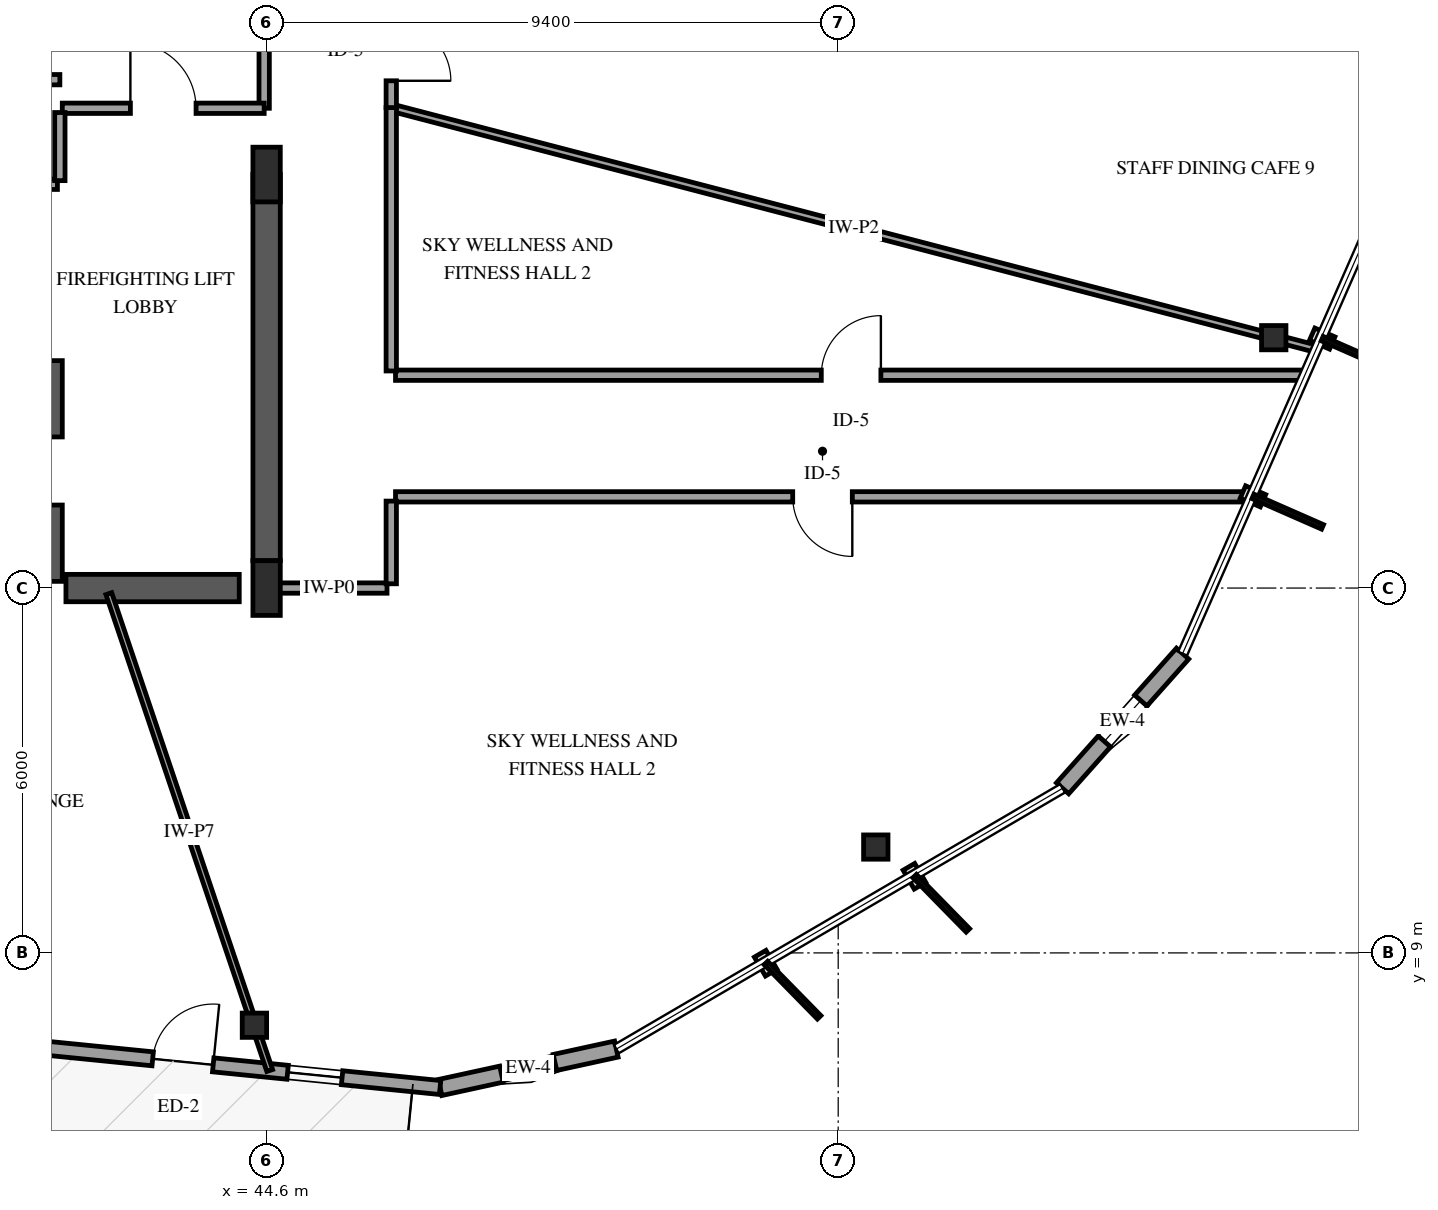
"""IFC4 building model, lengths in metres.
Left out: names, types, materials, properties, quantities, classifications, styles, units other than length and angle.
Written with IfcOpenShell. Run it as: python <this file> out.ifc"""

import sys

from ifc_helpers import new_model, si_unit, direction, frame, frame_2d, origin, origin_2d, place, context, subcontext, project, spatial, rectangle, i_section, extrude, element, fill, save


model = new_model("IFC4")
c1 = context("Model", 3, precision=1e-05, world=origin(), true_north=direction((0.0, 1.0)))
c2 = subcontext(c1, "Body", "Model", "MODEL_VIEW")
j1 = project(units=[si_unit("LENGTHUNIT", "METRE"), si_unit("PLANEANGLEUNIT", "RADIAN")], contexts=[c1])
p1 = place(None, origin())
s1 = spatial("IfcSite", under=j1, at=p1, CompositionType="ELEMENT")
p2 = place(p1, origin())
s2 = spatial("IfcBuilding", under=s1, at=p2, CompositionType="ELEMENT")
p3 = place(p2, frame((0.0, 0.0, 276.25)))
s3 = spatial("IfcBuildingStorey", under=s2, at=p3, CompositionType="ELEMENT", Elevation=276.25)
p4 = place(p3, frame((41.12, 15.11, 0.0), z_axis=(0.0, 0.0, 1.0), x_axis=(0.0, 1.0, 0.0)))
e1 = element("IfcWall", 1, at=p4, inside=s3, PredefinedType="SHEAR", context=c2, shape_type="SweptSolid", body=[
    extrude(rectangle(XDim=3.63, YDim=0.24, at=frame_2d((1.815, 0.0))), origin(), (0.0, 0.0, 1.0), 3.75),
])
p5 = place(p4, frame((1.255, 0.0, 0.0)))
e2 = element("IfcOpeningElement", 2, at=p5, cuts=e1, PredefinedType="OPENING", context=c2, shape_type="SweptSolid", body=[
    extrude(rectangle(XDim=1.12, YDim=2.15, at=frame_2d((0.56, 1.075))), frame((0.0, 0.13, 0.0), z_axis=(0.0, -1.0, 0.0), x_axis=(1.0, 0.0, 0.0)), (0.0, 0.0, 1.0), 0.26),
])
p6 = place(p3, frame((41.3, 15.0, 0.0), z_axis=(0.0, 0.0, 1.0), x_axis=(1.0, 0.0, 0.0)))
e3 = element("IfcWall", 3, at=p6, inside=s3, PredefinedType="SHEAR", context=c2, shape_type="SweptSolid", body=[
    extrude(rectangle(XDim=2.85, YDim=0.45, at=frame_2d((1.425, 0.0))), origin(), (0.0, 0.0, 1.0), 3.75),
])
p7 = place(p3, frame((44.6, 15.45, 0.0), z_axis=(0.0, 0.0, 1.0), x_axis=(0.0, 1.0, 0.0)))
e4 = element("IfcWall", 4, at=p7, inside=s3, PredefinedType="SHEAR", context=c2, shape_type="SweptSolid", body=[
    extrude(rectangle(XDim=6.35, YDim=0.45, at=frame_2d((3.175, 0.0))), origin(), (0.0, 0.0, 1.0), 3.75),
])
for number, where, z_axis, x_axis in (
    (5, (44.6, 15.0, 0.0), (0.0, 0.0, 1.0), (1.0, 0.0, 0.0)),
    (6, (44.6, 21.8, 0.0), (0.0, 0.0, 1.0), (1.0, 0.0, 0.0)),
):
    element("IfcColumn", number, at=place(p3, frame(where, z_axis=z_axis, x_axis=x_axis)), inside=s3, PredefinedType="PILASTER", context=c2, shape_type="SweptSolid", body=[
        extrude(rectangle(XDim=0.45, YDim=0.9, at=origin_2d()), origin(), (0.0, 0.0, 1.0), 3.75),
    ])
for number, where, z_axis, x_axis in (
    (7, (44.4, 7.811, 0.0), (0.0, 0.0, 1.0), (1.0, 0.0, 0.0)),
    (8, (54.618, 10.74, 0.0), (0.0, 0.0, 1.0), (1.0, 0.0, 0.0)),
    (9, (61.163, 19.117, 0.0), (0.0, 0.0, 1.0), (1.0, 0.0, 0.0)),
):
    element("IfcColumn", number, at=place(p3, frame(where, z_axis=z_axis, x_axis=x_axis)), inside=s3, PredefinedType="COLUMN", context=c2, shape_type="SweptSolid", body=[
        extrude(i_section(OverallWidth=0.401, OverallDepth=0.399, WebThickness=0.025, FlangeThickness=0.04, FilletRadius=0.038, at=origin_2d()), origin(), (0.0, 0.0, 1.0), 3.75),
    ])
p8 = place(p3, frame((47.453, 6.786, 0.0), z_axis=(0.0, 0.0, 1.0), x_axis=(0.977037259255, 0.21306851956, 0.0)))
e10 = element("IfcWall", 10, at=p8, inside=s3, PredefinedType="SOLIDWALL", context=c2, shape_type="SweptSolid", body=[
    extrude(rectangle(XDim=2.967, YDim=0.27, at=frame_2d((1.483, 0.0))), origin(), (0.0, 0.0, 1.0), 2.829),
])
p9 = place(p8, frame((1.033, 0.0, 0.75)))
e11 = element("IfcOpeningElement", 11, at=p9, cuts=e10, PredefinedType="OPENING", context=c2, shape_type="SweptSolid", body=[
    extrude(rectangle(XDim=0.9, YDim=1.5, at=frame_2d((0.45, 0.75))), frame((0.0, 0.145, 0.0), z_axis=(0.0, -1.0, 0.0), x_axis=(1.0, 0.0, 0.0)), (0.0, 0.0, 1.0), 0.29),
])
p10 = place(p3, frame((38.995, 7.631, 0.0), z_axis=(0.0, 0.0, 1.0), x_axis=(0.995055090482, -0.099324553384, 0.0)))
e12 = element("IfcWall", 12, at=p10, inside=s3, PredefinedType="SOLIDWALL", context=c2, shape_type="SweptSolid", body=[
    extrude(rectangle(XDim=8.5, YDim=0.23, at=frame_2d((4.25, 0.0))), origin(), (0.0, 0.0, 1.0), 2.829),
])
p11 = place(p10, frame((3.75, 0.0, 0.0)))
e13 = element("IfcOpeningElement", 13, at=p11, cuts=e12, PredefinedType="OPENING", context=c2, shape_type="SweptSolid", body=[
    extrude(rectangle(XDim=1.0, YDim=2.15, at=frame_2d((0.5, 1.075))), frame((0.0, 0.125, 0.0), z_axis=(0.0, -1.0, 0.0), x_axis=(1.0, 0.0, 0.0)), (0.0, 0.0, 1.0), 0.25),
])
p12 = place(p10, frame((0.44, 0.0, 0.72)))
e14 = element("IfcOpeningElement", 14, at=p12, cuts=e12, PredefinedType="OPENING", context=c2, shape_type="SweptSolid", body=[
    extrude(rectangle(XDim=0.9, YDim=1.5, at=frame_2d((0.45, 0.75))), frame((0.0, 0.125, 0.0), z_axis=(0.0, -1.0, 0.0), x_axis=(1.0, 0.0, 0.0)), (0.0, 0.0, 1.0), 0.25),
])
p13 = place(p10, frame((5.98, 0.0, 0.72)))
e15 = element("IfcOpeningElement", 15, at=p13, cuts=e12, PredefinedType="OPENING", context=c2, shape_type="SweptSolid", body=[
    extrude(rectangle(XDim=0.9, YDim=1.5, at=frame_2d((0.45, 0.75))), frame((0.0, 0.125, 0.0), z_axis=(0.0, -1.0, 0.0), x_axis=(1.0, 0.0, 0.0)), (0.0, 0.0, 1.0), 0.25),
])
p14 = place(p3, frame((57.69, 11.707, 0.0), z_axis=(0.0, 0.0, 1.0), x_axis=(0.665241909174, 0.746627887424, 0.0)))
e16 = element("IfcWall", 16, at=p14, inside=s3, PredefinedType="SOLIDWALL", context=c2, shape_type="SweptSolid", body=[
    extrude(rectangle(XDim=2.967, YDim=0.27, at=frame_2d((1.483, 0.0))), origin(), (0.0, 0.0, 1.0), 2.829),
])
p15 = place(p14, frame((1.033, 0.0, 0.75)))
e17 = element("IfcOpeningElement", 17, at=p15, cuts=e16, PredefinedType="OPENING", context=c2, shape_type="SweptSolid", body=[
    extrude(rectangle(XDim=0.9, YDim=1.5, at=frame_2d((0.45, 0.75))), frame((0.0, 0.145, 0.0), z_axis=(0.0, -1.0, 0.0), x_axis=(1.0, 0.0, 0.0)), (0.0, 0.0, 1.0), 0.29),
])
p16 = place(p3, frame((46.65, 22.901, 0.0), z_axis=(0.0, 0.0, 1.0), x_axis=(0.967649914042, -0.252296737702, 0.0)))
e18 = element("IfcWall", 18, at=p16, inside=s3, PredefinedType="PARTITIONING", context=c2, shape_type="SweptSolid", body=[
    extrude(rectangle(XDim=15.723, YDim=0.12, at=frame_2d((7.861, 0.0))), origin(), (0.0, 0.0, 1.0), 3.45),
])
p17 = place(p3, frame((46.72, 18.5, 0.0), z_axis=(0.0, 0.0, 1.0), x_axis=(1.0, 0.0, 0.0)))
e19 = element("IfcWall", 19, at=p17, inside=s3, PredefinedType="PARTITIONING", context=c2, shape_type="SweptSolid", body=[
    extrude(rectangle(XDim=14.953, YDim=0.17, at=frame_2d((7.477, 0.0))), origin(), (0.0, 0.0, 1.0), 2.745),
])
p18 = place(p17, frame((7.002, 0.0, 0.0)))
e20 = element("IfcOpeningElement", 20, at=p18, cuts=e19, PredefinedType="OPENING", context=c2, shape_type="SweptSolid", body=[
    extrude(rectangle(XDim=0.98, YDim=2.15, at=frame_2d((0.49, 1.075))), frame((0.0, 0.095, 0.0), z_axis=(0.0, -1.0, 0.0), x_axis=(1.0, 0.0, 0.0)), (0.0, 0.0, 1.0), 0.19),
])
p19 = place(p3, frame((60.795, 16.5, 0.0), z_axis=(0.0, 0.0, 1.0), x_axis=(-1.0, 0.0, 0.0)))
e21 = element("IfcWall", 21, at=p19, inside=s3, PredefinedType="PARTITIONING", context=c2, shape_type="SweptSolid", body=[
    extrude(rectangle(XDim=14.075, YDim=0.17, at=frame_2d((7.038, 0.0))), origin(), (0.0, 0.0, 1.0), 2.828),
])
p20 = place(p19, frame((6.563, 0.0, 0.0)))
e22 = element("IfcOpeningElement", 22, at=p20, cuts=e21, PredefinedType="OPENING", context=c2, shape_type="SweptSolid", body=[
    extrude(rectangle(XDim=0.98, YDim=2.15, at=frame_2d((0.49, 1.075))), frame((0.0, 0.095, 0.0), z_axis=(0.0, -1.0, 0.0), x_axis=(1.0, 0.0, 0.0)), (0.0, 0.0, 1.0), 0.19),
])
p21 = place(p3, frame((42.005, 14.908, 0.0), z_axis=(0.0, 0.0, 1.0), x_axis=(0.319703500681, -0.947517636592, 0.0)))
e23 = element("IfcWall", 23, at=p21, inside=s3, PredefinedType="PARTITIONING", context=c2, shape_type="SweptSolid", body=[
    extrude(rectangle(XDim=8.276, YDim=0.1, at=frame_2d((4.138, 0.0))), origin(), (0.0, 0.0, 1.0), 2.745),
])
p22 = place(p3, frame((44.56, 29.8, 0.0), z_axis=(0.0, 0.0, 1.0), x_axis=(0.0, -1.0, 0.0)))
e24 = element("IfcWall", 24, at=p22, inside=s3, PredefinedType="PARTITIONING", context=c2, shape_type="SweptSolid", body=[
    extrude(rectangle(XDim=6.91, YDim=0.17, at=frame_2d((3.455, 0.0))), origin(), (0.0, 0.0, 1.0), 2.49),
])
p23 = place(p22, frame((2.915, 0.0, 0.0)))
e25 = element("IfcOpeningElement", 25, at=p23, cuts=e24, PredefinedType="OPENING", context=c2, shape_type="SweptSolid", body=[
    extrude(rectangle(XDim=1.08, YDim=2.15, at=frame_2d((0.54, 1.075))), frame((0.0, 0.095, 0.0), z_axis=(0.0, -1.0, 0.0), x_axis=(1.0, 0.0, 0.0)), (0.0, 0.0, 1.0), 0.19),
])
p24 = place(p3, frame((46.65, 22.901, 0.0), z_axis=(0.0, 0.0, 1.0), x_axis=(0.0, -1.0, 0.0)))
e26 = element("IfcWall", 26, at=p24, inside=s3, PredefinedType="PARTITIONING", context=c2, shape_type="SweptSolid", body=[
    extrude(rectangle(XDim=4.331, YDim=0.17, at=frame_2d((2.166, 0.0))), origin(), (0.0, 0.0, 1.0), 3.45),
])
p25 = place(p3, frame((41.24, 22.89, 0.0), z_axis=(0.0, 0.0, 1.0), x_axis=(1.0, 0.0, 0.0)))
e27 = element("IfcWall", 27, at=p25, inside=s3, PredefinedType="PARTITIONING", context=c2, shape_type="SweptSolid", body=[
    extrude(rectangle(XDim=3.32, YDim=0.17, at=frame_2d((1.66, 0.0))), origin(), (0.0, 0.0, 1.0), 3.45),
])
p26 = place(p25, frame((1.12, 0.0, 0.0)))
e28 = element("IfcOpeningElement", 28, at=p26, cuts=e27, PredefinedType="OPENING", context=c2, shape_type="SweptSolid", body=[
    extrude(rectangle(XDim=1.08, YDim=2.15, at=frame_2d((0.54, 1.075))), frame((0.0, 0.095, 0.0), z_axis=(0.0, -1.0, 0.0), x_axis=(1.0, 0.0, 0.0)), (0.0, 0.0, 1.0), 0.19),
])
p27 = place(p3, frame((46.58, 15.0, 0.0), z_axis=(0.0, 0.0, 1.0), x_axis=(-1.0, 0.0, 0.0)))
e29 = element("IfcWall", 29, at=p27, inside=s3, PredefinedType="PARTITIONING", context=c2, shape_type="SweptSolid", body=[
    extrude(rectangle(XDim=1.91, YDim=0.17, at=frame_2d((0.955, 0.0))), origin(), (0.0, 0.0, 1.0), 3.45),
])
p28 = place(p3, frame((46.65, 24.794, 0.0), z_axis=(0.0, 0.0, 1.0), x_axis=(0.0, -1.0, 0.0)))
e30 = element("IfcWall", 30, at=p28, inside=s3, PredefinedType="PARTITIONING", context=c2, shape_type="SweptSolid", body=[
    extrude(rectangle(XDim=1.893, YDim=0.17, at=frame_2d((0.947, 0.0))), origin(), (0.0, 0.0, 1.0), 3.45),
])
p29 = place(p28, frame((0.472, 0.0, 0.0)))
e31 = element("IfcOpeningElement", 31, at=p29, cuts=e30, PredefinedType="OPENING", context=c2, shape_type="SweptSolid", body=[
    extrude(rectangle(XDim=0.98, YDim=2.15, at=frame_2d((0.49, 1.075))), frame((0.0, 0.095, 0.0), z_axis=(0.0, -1.0, 0.0), x_axis=(1.0, 0.0, 0.0)), (0.0, 0.0, 1.0), 0.19),
])
p30 = place(p3, frame((39.72, 21.64, 0.0), z_axis=(0.0, 0.0, 1.0), x_axis=(1.0, 0.0, 0.0)))
e32 = element("IfcWall", 32, at=p30, inside=s3, PredefinedType="PARTITIONING", context=c2, shape_type="SweptSolid", body=[
    extrude(rectangle(XDim=1.44, YDim=0.17, at=frame_2d((0.72, 0.0))), origin(), (0.0, 0.0, 1.0), 3.45),
])
p31 = place(p30, frame((0.295, 0.0, 0.0)))
e33 = element("IfcOpeningElement", 33, at=p31, cuts=e32, PredefinedType="OPENING", context=c2, shape_type="SweptSolid", body=[
    extrude(rectangle(XDim=0.85, YDim=2.1, at=frame_2d((0.425, 1.05))), frame((0.0, 0.095, 0.0), z_axis=(0.0, -1.0, 0.0), x_axis=(1.0, 0.0, 0.0)), (0.0, 0.0, 1.0), 0.19),
])
p32 = place(p3, frame((46.65, 16.43, 0.0), z_axis=(0.0, 0.0, 1.0), x_axis=(0.0, -1.0, 0.0)))
e34 = element("IfcWall", 34, at=p32, inside=s3, PredefinedType="PARTITIONING", context=c2, shape_type="SweptSolid", body=[
    extrude(rectangle(XDim=1.36, YDim=0.17, at=frame_2d((0.68, 0.0))), origin(), (0.0, 0.0, 1.0), 3.45),
])
p33 = place(p3, frame((41.2, 21.7, 0.0), z_axis=(0.0, 0.0, 1.0), x_axis=(0.0, 1.0, 0.0)))
e35 = element("IfcWall", 35, at=p33, inside=s3, PredefinedType="PARTITIONING", context=c2, shape_type="SweptSolid", body=[
    extrude(rectangle(XDim=1.12, YDim=0.17, at=frame_2d((0.56, 0.0))), origin(), (0.0, 0.0, 1.0), 3.45),
])
p34 = place(p3, frame((41.2, 23.36, 0.0), z_axis=(0.0, 0.0, 1.0), x_axis=(-1.0, 0.0, 0.0)))
e36 = element("IfcWall", 36, at=p34, inside=s3, PredefinedType="PARTITIONING", context=c2, shape_type="SweptSolid", body=[
    extrude(rectangle(XDim=1.48, YDim=0.17, at=frame_2d((0.74, 0.0))), origin(), (0.0, 0.0, 1.0), 3.45),
])
p35 = place(p9, origin())
e37 = element("IfcWindow", 37, at=p35, inside=s3, PartitioningType="SINGLE_PANEL", PredefinedType="WINDOW", context=c2, shape_type="SweptSolid", body=[
    extrude(rectangle(XDim=0.9, YDim=1.5, at=frame_2d((0.45, 0.75))), frame((0.0, 0.03, 0.0), z_axis=(0.0, -1.0, 0.0), x_axis=(1.0, 0.0, 0.0)), (0.0, 0.0, 1.0), 0.06),
])
fill(e11, e37)
p36 = place(p11, origin())
e38 = element("IfcDoor", 38, at=p36, inside=s3, OperationType="SINGLE_SWING_RIGHT", PredefinedType="DOOR", context=c2, shape_type="SweptSolid", body=[
    extrude(rectangle(XDim=1.0, YDim=2.15, at=frame_2d((0.5, 1.075))), frame((0.0, 0.025, 0.0), z_axis=(0.0, -1.0, 0.0), x_axis=(1.0, 0.0, 0.0)), (0.0, 0.0, 1.0), 0.05),
])
fill(e13, e38)
p37 = place(p13, origin())
e39 = element("IfcWindow", 39, at=p37, inside=s3, PartitioningType="SINGLE_PANEL", PredefinedType="WINDOW", context=c2, shape_type="SweptSolid", body=[
    extrude(rectangle(XDim=0.9, YDim=1.5, at=frame_2d((0.45, 0.75))), frame((0.0, 0.03, 0.0), z_axis=(0.0, -1.0, 0.0), x_axis=(1.0, 0.0, 0.0)), (0.0, 0.0, 1.0), 0.06),
])
fill(e15, e39)
p38 = place(p15, origin())
e40 = element("IfcWindow", 40, at=p38, inside=s3, PartitioningType="SINGLE_PANEL", PredefinedType="WINDOW", context=c2, shape_type="SweptSolid", body=[
    extrude(rectangle(XDim=0.9, YDim=1.5, at=frame_2d((0.45, 0.75))), frame((0.0, 0.03, 0.0), z_axis=(0.0, -1.0, 0.0), x_axis=(1.0, 0.0, 0.0)), (0.0, 0.0, 1.0), 0.06),
])
fill(e17, e40)
p39 = place(p5, origin())
e41 = element("IfcDoor", 41, at=p39, inside=s3, OperationType="SINGLE_SWING_LEFT", PredefinedType="DOOR", context=c2, shape_type="SweptSolid", body=[
    extrude(rectangle(XDim=1.12, YDim=2.15, at=frame_2d((0.56, 1.075))), frame((0.0, 0.025, 0.0), z_axis=(0.0, -1.0, 0.0), x_axis=(1.0, 0.0, 0.0)), (0.0, 0.0, 1.0), 0.05),
])
fill(e2, e41)
p40 = place(p18, origin())
e42 = element("IfcDoor", 42, at=p40, inside=s3, OperationType="SINGLE_SWING_RIGHT", PredefinedType="DOOR", context=c2, shape_type="SweptSolid", body=[
    extrude(rectangle(XDim=0.98, YDim=2.15, at=frame_2d((0.49, 1.075))), frame((0.0, 0.025, 0.0), z_axis=(0.0, -1.0, 0.0), x_axis=(1.0, 0.0, 0.0)), (0.0, 0.0, 1.0), 0.05),
])
fill(e20, e42)
p41 = place(p20, origin())
e43 = element("IfcDoor", 43, at=p41, inside=s3, OperationType="SINGLE_SWING_LEFT", PredefinedType="DOOR", context=c2, shape_type="SweptSolid", body=[
    extrude(rectangle(XDim=0.98, YDim=2.15, at=frame_2d((0.49, 1.075))), frame((0.0, 0.025, 0.0), z_axis=(0.0, -1.0, 0.0), x_axis=(1.0, 0.0, 0.0)), (0.0, 0.0, 1.0), 0.05),
])
fill(e22, e43)
p42 = place(p26, origin())
e44 = element("IfcDoor", 44, at=p42, inside=s3, OperationType="SINGLE_SWING_LEFT", PredefinedType="DOOR", context=c2, shape_type="SweptSolid", body=[
    extrude(rectangle(XDim=1.08, YDim=2.15, at=frame_2d((0.54, 1.075))), frame((0.0, 0.025, 0.0), z_axis=(0.0, -1.0, 0.0), x_axis=(1.0, 0.0, 0.0)), (0.0, 0.0, 1.0), 0.05),
])
fill(e28, e44)
p43 = place(p29, origin())
e45 = element("IfcDoor", 45, at=p43, inside=s3, OperationType="SINGLE_SWING_RIGHT", PredefinedType="DOOR", context=c2, shape_type="SweptSolid", body=[
    extrude(rectangle(XDim=0.98, YDim=2.15, at=frame_2d((0.49, 1.075))), frame((0.0, 0.025, 0.0), z_axis=(0.0, -1.0, 0.0), x_axis=(1.0, 0.0, 0.0)), (0.0, 0.0, 1.0), 0.05),
])
fill(e31, e45)
save(model, sys.argv[1])
